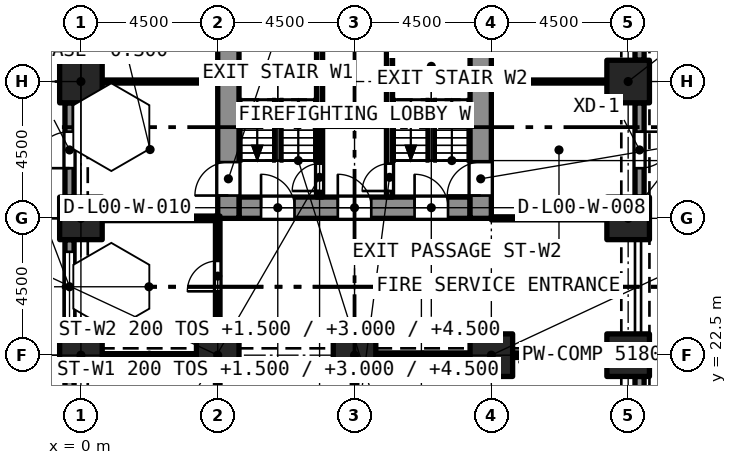
"""IFC4 building model, lengths in metres.
Left out: names, types, materials, properties, quantities, classifications, styles, units other than length and angle.
Written with IfcOpenShell. Run it as: python <this file> out.ifc"""

import sys

from ifc_helpers import new_model, si_unit, direction, frame, frame_2d, origin, origin_2d, place, context, subcontext, project, spatial, rectangle, extrude, element, fill, save


model = new_model("IFC4")
c1 = context("Model", 3, precision=1e-05, world=origin(), true_north=direction((0.0, 1.0)))
c2 = subcontext(c1, "Body", "Model", "MODEL_VIEW")
j1 = project(units=[si_unit("LENGTHUNIT", "METRE"), si_unit("PLANEANGLEUNIT", "RADIAN")], contexts=[c1])
p1 = place(None, origin())
s1 = spatial("IfcSite", under=j1, at=p1, CompositionType="ELEMENT")
p2 = place(p1, origin())
s2 = spatial("IfcBuilding", under=s1, at=p2, CompositionType="ELEMENT")
p3 = place(p2, origin())
s3 = spatial("IfcBuildingStorey", under=s2, at=p3, CompositionType="ELEMENT", Elevation=0.0)
for number, where, z_axis, x_axis in (
    (1, (0.0, 22.5, -0.3), (0.0, 0.0, 1.0), (1.0, 0.0, 0.0)),
    (2, (4.5, 22.5, -0.3), (0.0, 0.0, 1.0), (1.0, 0.0, 0.0)),
    (3, (9.0, 22.5, -0.3), (0.0, 0.0, 1.0), (1.0, 0.0, 0.0)),
    (4, (13.5, 22.5, -0.3), (0.0, 0.0, 1.0), (1.0, 0.0, 0.0)),
    (5, (18.0, 22.5, -0.3), (0.0, 0.0, 1.0), (1.0, 0.0, 0.0)),
    (6, (0.0, 27.0, -0.3), (0.0, 0.0, 1.0), (1.0, 0.0, 0.0)),
    (7, (18.0, 27.0, -0.3), (0.0, 0.0, 1.0), (1.0, 0.0, 0.0)),
    (8, (0.0, 31.5, -0.3), (0.0, 0.0, 1.0), (1.0, 0.0, 0.0)),
    (9, (18.0, 31.5, -0.3), (0.0, 0.0, 1.0), (1.0, 0.0, 0.0)),
):
    element("IfcColumn", number, at=place(p3, frame(where, z_axis=z_axis, x_axis=x_axis)), inside=s3, PredefinedType="COLUMN", context=c2, shape_type="SweptSolid", body=[
        extrude(rectangle(XDim=1.4, YDim=1.4, at=origin_2d()), origin(), (0.0, 0.0, 1.0), 6.3),
    ])
p4 = place(p3, frame((5.2, 27.35, -0.3), z_axis=(0.0, 0.0, 1.0), x_axis=(1.0, 0.0, 0.0)))
e10 = element("IfcWall", 10, at=p4, inside=s3, PredefinedType="SOLIDWALL", context=c2, shape_type="SweptSolid", body=[
    extrude(rectangle(XDim=7.6, YDim=0.7, at=frame_2d((3.8, 0.0))), origin(), (0.0, 0.0, 1.0), 6.3),
])
p5 = place(p4, frame((0.725, 0.0, 0.3)))
e11 = element("IfcOpeningElement", 11, at=p5, cuts=e10, PredefinedType="OPENING", context=c2, shape_type="SweptSolid", body=[
    extrude(rectangle(XDim=1.1, YDim=2.1, at=frame_2d((0.55, 1.05))), frame((0.0, 0.36, 0.0), z_axis=(0.0, -1.0, 0.0), x_axis=(1.0, 0.0, 0.0)), (0.0, 0.0, 1.0), 0.72),
])
p6 = place(p4, frame((3.25, 0.0, 0.3)))
e12 = element("IfcOpeningElement", 12, at=p6, cuts=e10, PredefinedType="OPENING", context=c2, shape_type="SweptSolid", body=[
    extrude(rectangle(XDim=1.1, YDim=2.1, at=frame_2d((0.55, 1.05))), frame((0.0, 0.36, 0.0), z_axis=(0.0, -1.0, 0.0), x_axis=(1.0, 0.0, 0.0)), (0.0, 0.0, 1.0), 0.72),
])
p7 = place(p4, frame((5.775, 0.0, 0.3)))
e13 = element("IfcOpeningElement", 13, at=p7, cuts=e10, PredefinedType="OPENING", context=c2, shape_type="SweptSolid", body=[
    extrude(rectangle(XDim=1.1, YDim=2.1, at=frame_2d((0.55, 1.05))), frame((0.0, 0.36, 0.0), z_axis=(0.0, -1.0, 0.0), x_axis=(1.0, 0.0, 0.0)), (0.0, 0.0, 1.0), 0.72),
])
p8 = place(p3, frame((4.85, 27.0, -0.3), z_axis=(0.0, 0.0, 1.0), x_axis=(0.0, 1.0, 0.0)))
e14 = element("IfcWall", 14, at=p8, inside=s3, PredefinedType="SOLIDWALL", context=c2, shape_type="SweptSolid", body=[
    extrude(rectangle(XDim=13.5, YDim=0.7, at=frame_2d((6.75, 0.0))), origin(), (0.0, 0.0, 1.0), 6.3),
])
p9 = place(p8, frame((0.75, 0.0, 0.3)))
e15 = element("IfcOpeningElement", 15, at=p9, cuts=e14, PredefinedType="OPENING", context=c2, shape_type="SweptSolid", body=[
    extrude(rectangle(XDim=1.1, YDim=2.1, at=frame_2d((0.55, 1.05))), frame((0.0, 0.36, 0.0), z_axis=(0.0, -1.0, 0.0), x_axis=(1.0, 0.0, 0.0)), (0.0, 0.0, 1.0), 0.72),
])
p10 = place(p8, frame((8.95, 0.0, 0.3)))
e16 = element("IfcOpeningElement", 16, at=p10, cuts=e14, PredefinedType="OPENING", context=c2, shape_type="SweptSolid", body=[
    extrude(rectangle(XDim=1.2, YDim=2.1, at=frame_2d((0.6, 1.05))), frame((0.0, 0.36, 0.0), z_axis=(0.0, -1.0, 0.0), x_axis=(1.0, 0.0, 0.0)), (0.0, 0.0, 1.0), 0.72),
])
p11 = place(p3, frame((13.15, 27.0, -0.3), z_axis=(0.0, 0.0, 1.0), x_axis=(0.0, 1.0, 0.0)))
e17 = element("IfcWall", 17, at=p11, inside=s3, PredefinedType="SOLIDWALL", context=c2, shape_type="SweptSolid", body=[
    extrude(rectangle(XDim=13.5, YDim=0.7, at=frame_2d((6.75, 0.0))), origin(), (0.0, 0.0, 1.0), 6.3),
])
p12 = place(p11, frame((0.75, 0.0, 0.3)))
e18 = element("IfcOpeningElement", 18, at=p12, cuts=e17, PredefinedType="OPENING", context=c2, shape_type="SweptSolid", body=[
    extrude(rectangle(XDim=1.1, YDim=2.1, at=frame_2d((0.55, 1.05))), frame((0.0, 0.36, 0.0), z_axis=(0.0, -1.0, 0.0), x_axis=(1.0, 0.0, 0.0)), (0.0, 0.0, 1.0), 0.72),
])
p13 = place(p11, frame((11.1, 0.0, 0.3)))
e19 = element("IfcOpeningElement", 19, at=p13, cuts=e17, PredefinedType="OPENING", context=c2, shape_type="SweptSolid", body=[
    extrude(rectangle(XDim=1.1, YDim=2.1, at=frame_2d((0.55, 1.05))), frame((0.0, 0.36, 0.0), z_axis=(0.0, -1.0, 0.0), x_axis=(1.0, 0.0, 0.0)), (0.0, 0.0, 1.0), 0.72),
])
p14 = place(p11, frame((8.95, 0.0, 0.3)))
e20 = element("IfcOpeningElement", 20, at=p14, cuts=e17, PredefinedType="OPENING", context=c2, shape_type="SweptSolid", body=[
    extrude(rectangle(XDim=1.2, YDim=2.1, at=frame_2d((0.6, 1.05))), frame((0.0, 0.36, 0.0), z_axis=(0.0, -1.0, 0.0), x_axis=(1.0, 0.0, 0.0)), (0.0, 0.0, 1.0), 0.72),
])
p15 = place(p3, frame((-0.375, 32.2, 0.0), z_axis=(0.0, 0.0, 1.0), x_axis=(0.0, 1.0, 0.0)))
e21 = element("IfcWall", 21, at=p15, inside=s3, PredefinedType="SOLIDWALL", context=c2, shape_type="SweptSolid", body=[
    extrude(rectangle(XDim=3.1, YDim=0.3, at=frame_2d((1.55, 0.0))), origin(), (0.0, 0.0, 1.0), 6.0),
])
p16 = place(p15, frame((0.4, 0.0, 0.45)))
e22 = element("IfcOpeningElement", 22, at=p16, cuts=e21, PredefinedType="OPENING", context=c2, shape_type="SweptSolid", body=[
    extrude(rectangle(XDim=2.3, YDim=3.3, at=frame_2d((1.15, 1.65))), frame((0.0, 0.16, 0.0), z_axis=(0.0, -1.0, 0.0), x_axis=(1.0, 0.0, 0.0)), (0.0, 0.0, 1.0), 0.32),
])
p17 = place(p3, frame((-0.375, 27.7, 0.0), z_axis=(0.0, 0.0, 1.0), x_axis=(0.0, 1.0, 0.0)))
e23 = element("IfcWall", 23, at=p17, inside=s3, PredefinedType="SOLIDWALL", context=c2, shape_type="SweptSolid", body=[
    extrude(rectangle(XDim=3.1, YDim=0.3, at=frame_2d((1.55, 0.0))), origin(), (0.0, 0.0, 1.0), 6.0),
])
p18 = place(p17, frame((0.95, 0.0, 0.0)))
e24 = element("IfcOpeningElement", 24, at=p18, cuts=e23, PredefinedType="OPENING", context=c2, shape_type="SweptSolid", body=[
    extrude(rectangle(XDim=1.2, YDim=2.4, at=frame_2d((0.6, 1.2))), frame((0.0, 0.16, 0.0), z_axis=(0.0, -1.0, 0.0), x_axis=(1.0, 0.0, 0.0)), (0.0, 0.0, 1.0), 0.32),
])
p19 = place(p3, frame((-0.375, 23.2, 0.0), z_axis=(0.0, 0.0, 1.0), x_axis=(0.0, 1.0, 0.0)))
e25 = element("IfcWall", 25, at=p19, inside=s3, PredefinedType="SOLIDWALL", context=c2, shape_type="SweptSolid", body=[
    extrude(rectangle(XDim=3.1, YDim=0.3, at=frame_2d((1.55, 0.0))), origin(), (0.0, 0.0, 1.0), 6.0),
])
p20 = place(p19, frame((0.4, 0.0, 0.45)))
e26 = element("IfcOpeningElement", 26, at=p20, cuts=e25, PredefinedType="OPENING", context=c2, shape_type="SweptSolid", body=[
    extrude(rectangle(XDim=2.3, YDim=3.3, at=frame_2d((1.15, 1.65))), frame((0.0, 0.16, 0.0), z_axis=(0.0, -1.0, 0.0), x_axis=(1.0, 0.0, 0.0)), (0.0, 0.0, 1.0), 0.32),
])
p21 = place(p3, frame((-0.375, 18.7, 0.0), z_axis=(0.0, 0.0, 1.0), x_axis=(0.0, 1.0, 0.0)))
e27 = element("IfcWall", 27, at=p21, inside=s3, PredefinedType="SOLIDWALL", context=c2, shape_type="SweptSolid", body=[
    extrude(rectangle(XDim=3.1, YDim=0.3, at=frame_2d((1.55, 0.0))), origin(), (0.0, 0.0, 1.0), 6.0),
])
p22 = place(p21, frame((0.4, 0.0, 0.45)))
e28 = element("IfcOpeningElement", 28, at=p22, cuts=e27, PredefinedType="OPENING", context=c2, shape_type="SweptSolid", body=[
    extrude(rectangle(XDim=2.3, YDim=3.3, at=frame_2d((1.15, 1.65))), frame((0.0, 0.16, 0.0), z_axis=(0.0, -1.0, 0.0), x_axis=(1.0, 0.0, 0.0)), (0.0, 0.0, 1.0), 0.32),
])
p23 = place(p3, frame((18.375, 21.8, 0.0), z_axis=(0.0, 0.0, 1.0), x_axis=(0.0, -1.0, 0.0)))
e29 = element("IfcWall", 29, at=p23, inside=s3, PredefinedType="SOLIDWALL", context=c2, shape_type="SweptSolid", body=[
    extrude(rectangle(XDim=3.1, YDim=0.3, at=frame_2d((1.55, 0.0))), origin(), (0.0, 0.0, 1.0), 6.0),
])
p24 = place(p23, frame((0.65, 0.0, 0.0)))
e30 = element("IfcOpeningElement", 30, at=p24, cuts=e29, PredefinedType="OPENING", context=c2, shape_type="SweptSolid", body=[
    extrude(rectangle(XDim=1.8, YDim=2.4, at=frame_2d((0.9, 1.2))), frame((0.0, 0.16, 0.0), z_axis=(0.0, -1.0, 0.0), x_axis=(1.0, 0.0, 0.0)), (0.0, 0.0, 1.0), 0.32),
])
p25 = place(p3, frame((18.375, 30.8, 0.0), z_axis=(0.0, 0.0, 1.0), x_axis=(0.0, -1.0, 0.0)))
e31 = element("IfcWall", 31, at=p25, inside=s3, PredefinedType="SOLIDWALL", context=c2, shape_type="SweptSolid", body=[
    extrude(rectangle(XDim=3.1, YDim=0.3, at=frame_2d((1.55, 0.0))), origin(), (0.0, 0.0, 1.0), 6.0),
])
p26 = place(p25, frame((0.95, 0.0, 0.0)))
e32 = element("IfcOpeningElement", 32, at=p26, cuts=e31, PredefinedType="OPENING", context=c2, shape_type="SweptSolid", body=[
    extrude(rectangle(XDim=1.2, YDim=2.4, at=frame_2d((0.6, 1.2))), frame((0.0, 0.16, 0.0), z_axis=(0.0, -1.0, 0.0), x_axis=(1.0, 0.0, 0.0)), (0.0, 0.0, 1.0), 0.32),
])
p27 = place(p3, frame((18.375, 35.3, 0.0), z_axis=(0.0, 0.0, 1.0), x_axis=(0.0, -1.0, 0.0)))
e33 = element("IfcWall", 33, at=p27, inside=s3, PredefinedType="SOLIDWALL", context=c2, shape_type="SweptSolid", body=[
    extrude(rectangle(XDim=3.1, YDim=0.3, at=frame_2d((1.55, 0.0))), origin(), (0.0, 0.0, 1.0), 6.0),
])
p28 = place(p27, frame((0.65, 0.0, 0.0)))
e34 = element("IfcOpeningElement", 34, at=p28, cuts=e33, PredefinedType="OPENING", context=c2, shape_type="SweptSolid", body=[
    extrude(rectangle(XDim=1.8, YDim=2.4, at=frame_2d((0.9, 1.2))), frame((0.0, 0.16, 0.0), z_axis=(0.0, -1.0, 0.0), x_axis=(1.0, 0.0, 0.0)), (0.0, 0.0, 1.0), 0.32),
])
p29 = place(p3, frame((7.85, 27.7, 0.0), z_axis=(0.0, 0.0, 1.0), x_axis=(0.0, 1.0, 0.0)))
e35 = element("IfcWall", 35, at=p29, inside=s3, PredefinedType="SOLIDWALL", context=c2, shape_type="SweptSolid", body=[
    extrude(rectangle(XDim=5.4, YDim=0.2, at=frame_2d((2.7, 0.0))), origin(), (0.0, 0.0, 1.0), 5.65),
])
p30 = place(p29, frame((0.2, 0.0, 0.0)))
e36 = element("IfcOpeningElement", 36, at=p30, cuts=e35, PredefinedType="OPENING", context=c2, shape_type="SweptSolid", body=[
    extrude(rectangle(XDim=0.9, YDim=2.1, at=frame_2d((0.45, 1.05))), frame((0.0, 0.11, 0.0), z_axis=(0.0, -1.0, 0.0), x_axis=(1.0, 0.0, 0.0)), (0.0, 0.0, 1.0), 0.22),
])
p31 = place(p3, frame((10.15, 27.7, 0.0), z_axis=(0.0, 0.0, 1.0), x_axis=(0.0, 1.0, 0.0)))
e37 = element("IfcWall", 37, at=p31, inside=s3, PredefinedType="SOLIDWALL", context=c2, shape_type="SweptSolid", body=[
    extrude(rectangle(XDim=5.4, YDim=0.2, at=frame_2d((2.7, 0.0))), origin(), (0.0, 0.0, 1.0), 5.65),
])
p32 = place(p31, frame((0.2, 0.0, 0.0)))
e38 = element("IfcOpeningElement", 38, at=p32, cuts=e37, PredefinedType="OPENING", context=c2, shape_type="SweptSolid", body=[
    extrude(rectangle(XDim=0.9, YDim=2.1, at=frame_2d((0.45, 1.05))), frame((0.0, 0.11, 0.0), z_axis=(0.0, -1.0, 0.0), x_axis=(1.0, 0.0, 0.0)), (0.0, 0.0, 1.0), 0.22),
])
p33 = place(p3, frame((4.5, 23.2, 0.0), z_axis=(0.0, 0.0, 1.0), x_axis=(0.0, 1.0, 0.0)))
e39 = element("IfcWall", 39, at=p33, inside=s3, PredefinedType="PARTITIONING", context=c2, shape_type="SweptSolid", body=[
    extrude(rectangle(XDim=3.875, YDim=0.15, at=frame_2d((1.938, 0.0))), origin(), (0.0, 0.0, 1.0), 5.65),
])
p34 = place(p33, frame((1.4, 0.0, 0.0)))
e40 = element("IfcOpeningElement", 40, at=p34, cuts=e39, PredefinedType="OPENING", context=c2, shape_type="SweptSolid", body=[
    extrude(rectangle(XDim=1.0, YDim=2.1, at=frame_2d((0.5, 1.05))), frame((0.0, 0.085, 0.0), z_axis=(0.0, -1.0, 0.0), x_axis=(1.0, 0.0, 0.0)), (0.0, 0.0, 1.0), 0.17),
])
p35 = place(p3, frame((0.7, 22.5, 0.0), z_axis=(0.0, 0.0, 1.0), x_axis=(1.0, 0.0, 0.0)))
e41 = element("IfcWall", 41, at=p35, inside=s3, PredefinedType="PARTITIONING", context=c2, shape_type="SweptSolid", body=[
    extrude(rectangle(XDim=3.1, YDim=0.1, at=frame_2d((1.55, 0.0))), origin(), (0.0, 0.0, 1.0), 5.18),
])
p36 = place(p3, frame((0.7, 27.0, 0.0), z_axis=(0.0, 0.0, 1.0), x_axis=(1.0, 0.0, 0.0)))
e42 = element("IfcWall", 42, at=p36, inside=s3, PredefinedType="PARTITIONING", context=c2, shape_type="SweptSolid", body=[
    extrude(rectangle(XDim=3.725, YDim=0.15, at=frame_2d((1.863, 0.0))), origin(), (0.0, 0.0, 1.0), 5.65),
])
for number, where, z_axis, x_axis in (
    (43, (9.7, 22.5, 0.0), (0.0, 0.0, 1.0), (1.0, 0.0, 0.0)),
    (44, (14.2, 22.5, 0.0), (0.0, 0.0, 1.0), (1.0, 0.0, 0.0)),
):
    element("IfcWall", number, at=place(p3, frame(where, z_axis=z_axis, x_axis=x_axis)), inside=s3, PredefinedType="PARTITIONING", context=c2, shape_type="SweptSolid", body=[
        extrude(rectangle(XDim=3.1, YDim=0.15, at=frame_2d((1.55, 0.0))), origin(), (0.0, 0.0, 1.0), 5.18),
    ])
for number, where, z_axis, x_axis in (
    (45, (13.5, 27.0, 0.0), (0.0, 0.0, 1.0), (1.0, 0.0, 0.0)),
    (46, (13.5, 31.5, 0.0), (0.0, 0.0, 1.0), (1.0, 0.0, 0.0)),
    (47, (0.7, 31.5, 0.0), (0.0, 0.0, 1.0), (1.0, 0.0, 0.0)),
):
    element("IfcWall", number, at=place(p3, frame(where, z_axis=z_axis, x_axis=x_axis)), inside=s3, PredefinedType="PARTITIONING", context=c2, shape_type="SweptSolid", body=[
        extrude(rectangle(XDim=3.8, YDim=0.1, at=frame_2d((1.9, 0.0))), origin(), (0.0, 0.0, 1.0), 5.65),
    ])
p37 = place(p3, frame((9.0, 0.7, 0.0), z_axis=(0.0, 0.0, 1.0), x_axis=(0.0, 1.0, 0.0)))
e48 = element("IfcWall", 48, at=p37, inside=s3, PredefinedType="PARTITIONING", context=c2, shape_type="SweptSolid", body=[
    extrude(rectangle(XDim=21.1, YDim=0.15, at=frame_2d((10.55, 0.0))), origin(), (0.0, 0.0, 1.0), 5.65),
])
p38 = place(p3, frame((4.5, 13.5, 0.0), z_axis=(0.0, 0.0, 1.0), x_axis=(0.0, 1.0, 0.0)))
e49 = element("IfcWall", 49, at=p38, inside=s3, PredefinedType="PARTITIONING", context=c2, shape_type="SweptSolid", body=[
    extrude(rectangle(XDim=8.3, YDim=0.15, at=frame_2d((4.15, 0.0))), origin(), (0.0, 0.0, 1.0), 5.65),
])
p39 = place(p38, frame((3.75, 0.0, 0.0)))
e50 = element("IfcOpeningElement", 50, at=p39, cuts=e49, PredefinedType="OPENING", context=c2, shape_type="SweptSolid", body=[
    extrude(rectangle(XDim=0.8, YDim=2.1, at=frame_2d((0.4, 1.05))), frame((0.0, 0.085, 0.0), z_axis=(0.0, -1.0, 0.0), x_axis=(1.0, 0.0, 0.0)), (0.0, 0.0, 1.0), 0.17),
])
p40 = place(p20, origin())
e51 = element("IfcWindow", 51, at=p40, inside=s3, PartitioningType="SINGLE_PANEL", PredefinedType="WINDOW", context=c2, shape_type="SweptSolid", body=[
    extrude(rectangle(XDim=2.3, YDim=3.3, at=frame_2d((1.15, 1.65))), frame((0.0, 0.03, 0.0), z_axis=(0.0, -1.0, 0.0), x_axis=(1.0, 0.0, 0.0)), (0.0, 0.0, 1.0), 0.06),
])
fill(e26, e51)
p41 = place(p26, origin())
e52 = element("IfcDoor", 52, at=p41, inside=s3, OperationType="SINGLE_SWING_LEFT", PredefinedType="DOOR", context=c2, shape_type="SweptSolid", body=[
    extrude(rectangle(XDim=1.2, YDim=2.4, at=frame_2d((0.6, 1.2))), frame((0.0, 0.025, 0.0), z_axis=(0.0, -1.0, 0.0), x_axis=(1.0, 0.0, 0.0)), (0.0, 0.0, 1.0), 0.05),
])
fill(e32, e52)
p42 = place(p18, origin())
e53 = element("IfcDoor", 53, at=p42, inside=s3, OperationType="SINGLE_SWING_LEFT", PredefinedType="DOOR", context=c2, shape_type="SweptSolid", body=[
    extrude(rectangle(XDim=1.2, YDim=2.4, at=frame_2d((0.6, 1.2))), frame((0.0, 0.025, 0.0), z_axis=(0.0, -1.0, 0.0), x_axis=(1.0, 0.0, 0.0)), (0.0, 0.0, 1.0), 0.05),
])
fill(e24, e53)
p43 = place(p30, origin())
e54 = element("IfcDoor", 54, at=p43, inside=s3, OperationType="SINGLE_SWING_LEFT", PredefinedType="DOOR", context=c2, shape_type="SweptSolid", body=[
    extrude(rectangle(XDim=0.9, YDim=2.1, at=frame_2d((0.45, 1.05))), frame((0.0, 0.025, 0.0), z_axis=(0.0, -1.0, 0.0), x_axis=(1.0, 0.0, 0.0)), (0.0, 0.0, 1.0), 0.05),
])
fill(e36, e54)
p44 = place(p32, origin())
e55 = element("IfcDoor", 55, at=p44, inside=s3, OperationType="SINGLE_SWING_LEFT", PredefinedType="DOOR", context=c2, shape_type="SweptSolid", body=[
    extrude(rectangle(XDim=0.9, YDim=2.1, at=frame_2d((0.45, 1.05))), frame((0.0, 0.025, 0.0), z_axis=(0.0, -1.0, 0.0), x_axis=(1.0, 0.0, 0.0)), (0.0, 0.0, 1.0), 0.05),
])
fill(e38, e55)
p45 = place(p5, origin())
e56 = element("IfcDoor", 56, at=p45, inside=s3, OperationType="SINGLE_SWING_LEFT", PredefinedType="DOOR", context=c2, shape_type="SweptSolid", body=[
    extrude(rectangle(XDim=1.1, YDim=2.1, at=frame_2d((0.55, 1.05))), frame((0.0, 0.025, 0.0), z_axis=(0.0, -1.0, 0.0), x_axis=(1.0, 0.0, 0.0)), (0.0, 0.0, 1.0), 0.05),
])
fill(e11, e56)
p46 = place(p6, origin())
e57 = element("IfcDoor", 57, at=p46, inside=s3, OperationType="SINGLE_SWING_LEFT", PredefinedType="DOOR", context=c2, shape_type="SweptSolid", body=[
    extrude(rectangle(XDim=1.1, YDim=2.1, at=frame_2d((0.55, 1.05))), frame((0.0, 0.025, 0.0), z_axis=(0.0, -1.0, 0.0), x_axis=(1.0, 0.0, 0.0)), (0.0, 0.0, 1.0), 0.05),
])
fill(e12, e57)
p47 = place(p7, origin())
e58 = element("IfcDoor", 58, at=p47, inside=s3, OperationType="SINGLE_SWING_LEFT", PredefinedType="DOOR", context=c2, shape_type="SweptSolid", body=[
    extrude(rectangle(XDim=1.1, YDim=2.1, at=frame_2d((0.55, 1.05))), frame((0.0, 0.025, 0.0), z_axis=(0.0, -1.0, 0.0), x_axis=(1.0, 0.0, 0.0)), (0.0, 0.0, 1.0), 0.05),
])
fill(e13, e58)
p48 = place(p9, origin())
e59 = element("IfcDoor", 59, at=p48, inside=s3, OperationType="SINGLE_SWING_LEFT", PredefinedType="DOOR", context=c2, shape_type="SweptSolid", body=[
    extrude(rectangle(XDim=1.1, YDim=2.1, at=frame_2d((0.55, 1.05))), frame((0.0, 0.025, 0.0), z_axis=(0.0, -1.0, 0.0), x_axis=(1.0, 0.0, 0.0)), (0.0, 0.0, 1.0), 0.05),
])
fill(e15, e59)
p49 = place(p12, origin())
e60 = element("IfcDoor", 60, at=p49, inside=s3, OperationType="SINGLE_SWING_LEFT", PredefinedType="DOOR", context=c2, shape_type="SweptSolid", body=[
    extrude(rectangle(XDim=1.1, YDim=2.1, at=frame_2d((0.55, 1.05))), frame((0.0, 0.025, 0.0), z_axis=(0.0, -1.0, 0.0), x_axis=(1.0, 0.0, 0.0)), (0.0, 0.0, 1.0), 0.05),
])
fill(e18, e60)
p50 = place(p34, origin())
e61 = element("IfcDoor", 61, at=p50, inside=s3, OperationType="SINGLE_SWING_LEFT", PredefinedType="DOOR", context=c2, shape_type="SweptSolid", body=[
    extrude(rectangle(XDim=1.0, YDim=2.1, at=frame_2d((0.5, 1.05))), frame((0.0, 0.025, 0.0), z_axis=(0.0, -1.0, 0.0), x_axis=(1.0, 0.0, 0.0)), (0.0, 0.0, 1.0), 0.05),
])
fill(e40, e61)
save(model, sys.argv[1])
